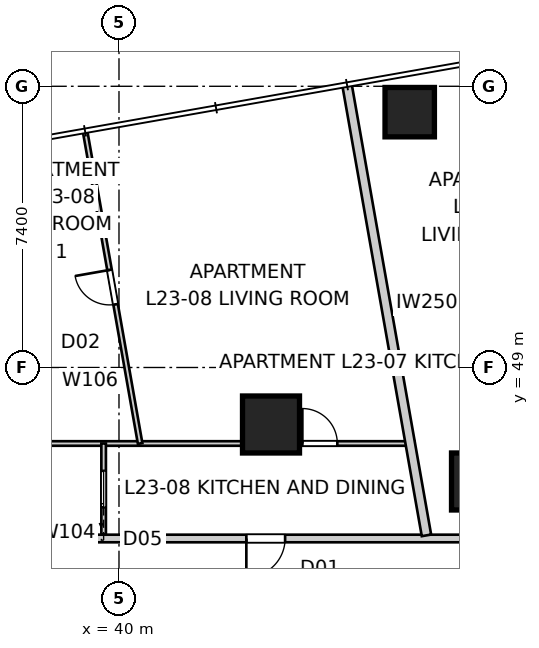
"""IFC4 building model, lengths in metres.
Left out: names, types, materials, properties, quantities, classifications, styles, units other than length and angle.
Written with IfcOpenShell. Run it as: python <this file> out.ifc"""

import sys

from ifc_helpers import new_model, si_unit, direction, frame, frame_2d, origin, origin_2d, place, context, subcontext, project, spatial, rectangle, extrude, element, fill, save


model = new_model("IFC4")
c1 = context("Model", 3, precision=1e-05, world=origin(), true_north=direction((0.0, 1.0)))
c2 = subcontext(c1, "Body", "Model", "MODEL_VIEW")
j1 = project(units=[si_unit("LENGTHUNIT", "METRE"), si_unit("PLANEANGLEUNIT", "RADIAN")], contexts=[c1])
p1 = place(None, origin())
s1 = spatial("IfcSite", under=j1, at=p1, CompositionType="ELEMENT")
p2 = place(p1, origin())
s2 = spatial("IfcBuilding", under=s1, at=p2, CompositionType="ELEMENT")
p3 = place(p2, frame((0.0, 0.0, 86.2)))
s3 = spatial("IfcBuildingStorey", under=s2, at=p3, CompositionType="ELEMENT", Elevation=86.2)
p4 = place(p3, frame((47.65, 55.719, 0.0), z_axis=(0.0, 0.0, 1.0), x_axis=(1.0, 0.0, 0.0)))
e1 = element("IfcColumn", 1, at=p4, inside=s3, PredefinedType="COLUMN", context=c2, shape_type="SweptSolid", body=[
    extrude(rectangle(XDim=1.3, YDim=1.3, at=origin_2d()), origin(), (0.0, 0.0, 1.0), 3.4),
])
for number, where, z_axis, x_axis in (
    (2, (49.5, 46.0, 0.0), (0.0, 0.0, 1.0), (1.0, 0.0, 0.0)),
    (3, (44.0, 47.5, 0.0), (0.0, 0.0, 1.0), (1.0, 0.0, 0.0)),
):
    element("IfcColumn", number, at=place(p3, frame(where, z_axis=z_axis, x_axis=x_axis)), inside=s3, PredefinedType="COLUMN", context=c2, shape_type="SweptSolid", body=[
        extrude(rectangle(XDim=1.5, YDim=1.5, at=origin_2d()), origin(), (0.0, 0.0, 1.0), 3.4),
    ])
p5 = place(p3, frame((54.5, 44.5, 0.0), z_axis=(0.0, 0.0, 1.0), x_axis=(-1.0, 0.0, 0.0)))
e4 = element("IfcWall", 4, at=p5, inside=s3, PredefinedType="PARTITIONING", context=c2, shape_type="SweptSolid", body=[
    extrude(rectangle(XDim=29.0, YDim=0.2, at=frame_2d((14.5, 0.0))), origin(), (0.0, 0.0, 1.0), 3.25),
])
p6 = place(p5, frame((10.129, 0.0, 0.0)))
e5 = element("IfcOpeningElement", 5, at=p6, cuts=e4, PredefinedType="OPENING", context=c2, shape_type="SweptSolid", body=[
    extrude(rectangle(XDim=1.02, YDim=2.34, at=frame_2d((0.51, 1.17))), frame((0.0, 0.11, 0.0), z_axis=(0.0, -1.0, 0.0), x_axis=(1.0, 0.0, 0.0)), (0.0, 0.0, 1.0), 0.22),
])
p7 = place(p5, frame((3.065, 0.0, 0.0)))
e6 = element("IfcOpeningElement", 6, at=p7, cuts=e4, PredefinedType="OPENING", context=c2, shape_type="SweptSolid", body=[
    extrude(rectangle(XDim=1.02, YDim=2.1, at=frame_2d((0.51, 1.05))), frame((0.0, 0.11, 0.0), z_axis=(0.0, -1.0, 0.0), x_axis=(1.0, 0.0, 0.0)), (0.0, 0.0, 1.0), 0.22),
])
p8 = place(p3, frame((45.999, 56.444, 0.0), z_axis=(0.0, 0.0, 1.0), x_axis=(0.173654664517, -0.984806609184, 0.0)))
e7 = element("IfcWall", 7, at=p8, inside=s3, PredefinedType="PARTITIONING", context=c2, shape_type="SweptSolid", body=[
    extrude(rectangle(XDim=12.044, YDim=0.25, at=frame_2d((6.022, 0.0))), origin(), (0.0, 0.0, 1.0), 3.25),
])
p9 = place(p3, frame((23.0, 47.0, 0.0), z_axis=(0.0, 0.0, 1.0), x_axis=(1.0, 0.0, 0.0)))
e8 = element("IfcWall", 8, at=p9, inside=s3, PredefinedType="PARTITIONING", context=c2, shape_type="SweptSolid", body=[
    extrude(rectangle(XDim=24.771, YDim=0.12, at=frame_2d((12.386, 0.0))), origin(), (0.0, 0.0, 1.0), 2.55),
])
p10 = place(p9, frame((21.825, 0.0, 0.0)))
e9 = element("IfcOpeningElement", 9, at=p10, cuts=e8, PredefinedType="OPENING", context=c2, shape_type="SweptSolid", body=[
    extrude(rectangle(XDim=0.92, YDim=2.34, at=frame_2d((0.46, 1.17))), frame((0.0, 0.07, 0.0), z_axis=(0.0, -1.0, 0.0), x_axis=(1.0, 0.0, 0.0)), (0.0, 0.0, 1.0), 0.14),
])
p11 = place(p9, frame((11.135, 0.0, 0.0)))
e10 = element("IfcOpeningElement", 10, at=p11, cuts=e8, PredefinedType="OPENING", context=c2, shape_type="SweptSolid", body=[
    extrude(rectangle(XDim=0.96, YDim=2.1, at=frame_2d((0.48, 1.05))), frame((0.0, 0.07, 0.0), z_axis=(0.0, -1.0, 0.0), x_axis=(1.0, 0.0, 0.0)), (0.0, 0.0, 1.0), 0.14),
])
p12 = place(p9, frame((1.19, 0.0, 0.0)))
e11 = element("IfcOpeningElement", 11, at=p12, cuts=e8, PredefinedType="OPENING", context=c2, shape_type="SweptSolid", body=[
    extrude(rectangle(XDim=0.96, YDim=2.1, at=frame_2d((0.48, 1.05))), frame((0.0, 0.07, 0.0), z_axis=(0.0, -1.0, 0.0), x_axis=(1.0, 0.0, 0.0)), (0.0, 0.0, 1.0), 0.14),
])
p13 = place(p9, frame((8.342, 0.0, 0.0)))
e12 = element("IfcOpeningElement", 12, at=p13, cuts=e8, PredefinedType="OPENING", context=c2, shape_type="SweptSolid", body=[
    extrude(rectangle(XDim=0.96, YDim=2.1, at=frame_2d((0.48, 1.05))), frame((0.0, 0.07, 0.0), z_axis=(0.0, -1.0, 0.0), x_axis=(1.0, 0.0, 0.0)), (0.0, 0.0, 1.0), 0.14),
])
p14 = place(p9, frame((4.663, 0.0, 0.0)))
e13 = element("IfcOpeningElement", 13, at=p14, cuts=e8, PredefinedType="OPENING", context=c2, shape_type="SweptSolid", body=[
    extrude(rectangle(XDim=0.96, YDim=2.1, at=frame_2d((0.48, 1.05))), frame((0.0, 0.07, 0.0), z_axis=(0.0, -1.0, 0.0), x_axis=(1.0, 0.0, 0.0)), (0.0, 0.0, 1.0), 0.14),
])
p15 = place(p3, frame((39.596, 44.6, 0.0), z_axis=(0.0, 0.0, 1.0), x_axis=(0.0, 1.0, 0.0)))
e14 = element("IfcWall", 14, at=p15, inside=s3, PredefinedType="PARTITIONING", context=c2, shape_type="SweptSolid", body=[
    extrude(rectangle(XDim=2.4, YDim=0.12, at=frame_2d((1.2, 0.0))), origin(), (0.0, 0.0, 1.0), 3.25),
])
p16 = place(p15, frame((0.72, 0.0, 0.0)))
e15 = element("IfcOpeningElement", 15, at=p16, cuts=e14, PredefinedType="OPENING", context=c2, shape_type="SweptSolid", body=[
    extrude(rectangle(XDim=0.96, YDim=2.1, at=frame_2d((0.48, 1.05))), frame((0.0, 0.07, 0.0), z_axis=(0.0, -1.0, 0.0), x_axis=(1.0, 0.0, 0.0)), (0.0, 0.0, 1.0), 0.14),
])
p17 = place(p3, frame((40.556, 47.0, 0.0), z_axis=(0.0, 0.0, 1.0), x_axis=(-0.173647980238, 0.984807787824, 0.0)))
e16 = element("IfcWall", 16, at=p17, inside=s3, PredefinedType="PARTITIONING", context=c2, shape_type="SweptSolid", body=[
    extrude(rectangle(XDim=8.315, YDim=0.12, at=frame_2d((4.157, 0.0))), origin(), (0.0, 0.0, 1.0), 3.25),
])
p18 = place(p17, frame((3.718, 0.0, 0.0)))
e17 = element("IfcOpeningElement", 17, at=p18, cuts=e16, PredefinedType="OPENING", context=c2, shape_type="SweptSolid", body=[
    extrude(rectangle(XDim=0.92, YDim=2.34, at=frame_2d((0.46, 1.17))), frame((0.0, 0.07, 0.0), z_axis=(0.0, -1.0, 0.0), x_axis=(1.0, 0.0, 0.0)), (0.0, 0.0, 1.0), 0.14),
])
p19 = place(p6, origin())
e18 = element("IfcDoor", 18, at=p19, inside=s3, OperationType="SINGLE_SWING_RIGHT", PredefinedType="DOOR", context=c2, shape_type="SweptSolid", body=[
    extrude(rectangle(XDim=1.02, YDim=2.34, at=frame_2d((0.51, 1.17))), frame((0.0, 0.025, 0.0), z_axis=(0.0, -1.0, 0.0), x_axis=(1.0, 0.0, 0.0)), (0.0, 0.0, 1.0), 0.05),
])
fill(e5, e18)
p20 = place(p10, origin())
e19 = element("IfcDoor", 19, at=p20, inside=s3, OperationType="SINGLE_SWING_LEFT", PredefinedType="DOOR", context=c2, shape_type="SweptSolid", body=[
    extrude(rectangle(XDim=0.92, YDim=2.34, at=frame_2d((0.46, 1.17))), frame((0.0, 0.025, 0.0), z_axis=(0.0, -1.0, 0.0), x_axis=(1.0, 0.0, 0.0)), (0.0, 0.0, 1.0), 0.05),
])
fill(e9, e19)
p21 = place(p16, origin())
e20 = element("IfcDoor", 20, at=p21, inside=s3, OperationType="SLIDING_TO_LEFT", PredefinedType="DOOR", context=c2, shape_type="SweptSolid", body=[
    extrude(rectangle(XDim=0.96, YDim=2.1, at=frame_2d((0.48, 1.05))), frame((0.0, 0.025, 0.0), z_axis=(0.0, -1.0, 0.0), x_axis=(1.0, 0.0, 0.0)), (0.0, 0.0, 1.0), 0.05),
])
fill(e15, e20)
p22 = place(p18, origin())
e21 = element("IfcDoor", 21, at=p22, inside=s3, OperationType="SINGLE_SWING_RIGHT", PredefinedType="DOOR", context=c2, shape_type="SweptSolid", body=[
    extrude(rectangle(XDim=0.92, YDim=2.34, at=frame_2d((0.46, 1.17))), frame((0.0, 0.025, 0.0), z_axis=(0.0, -1.0, 0.0), x_axis=(1.0, 0.0, 0.0)), (0.0, 0.0, 1.0), 0.05),
])
fill(e17, e21)
save(model, sys.argv[1])
